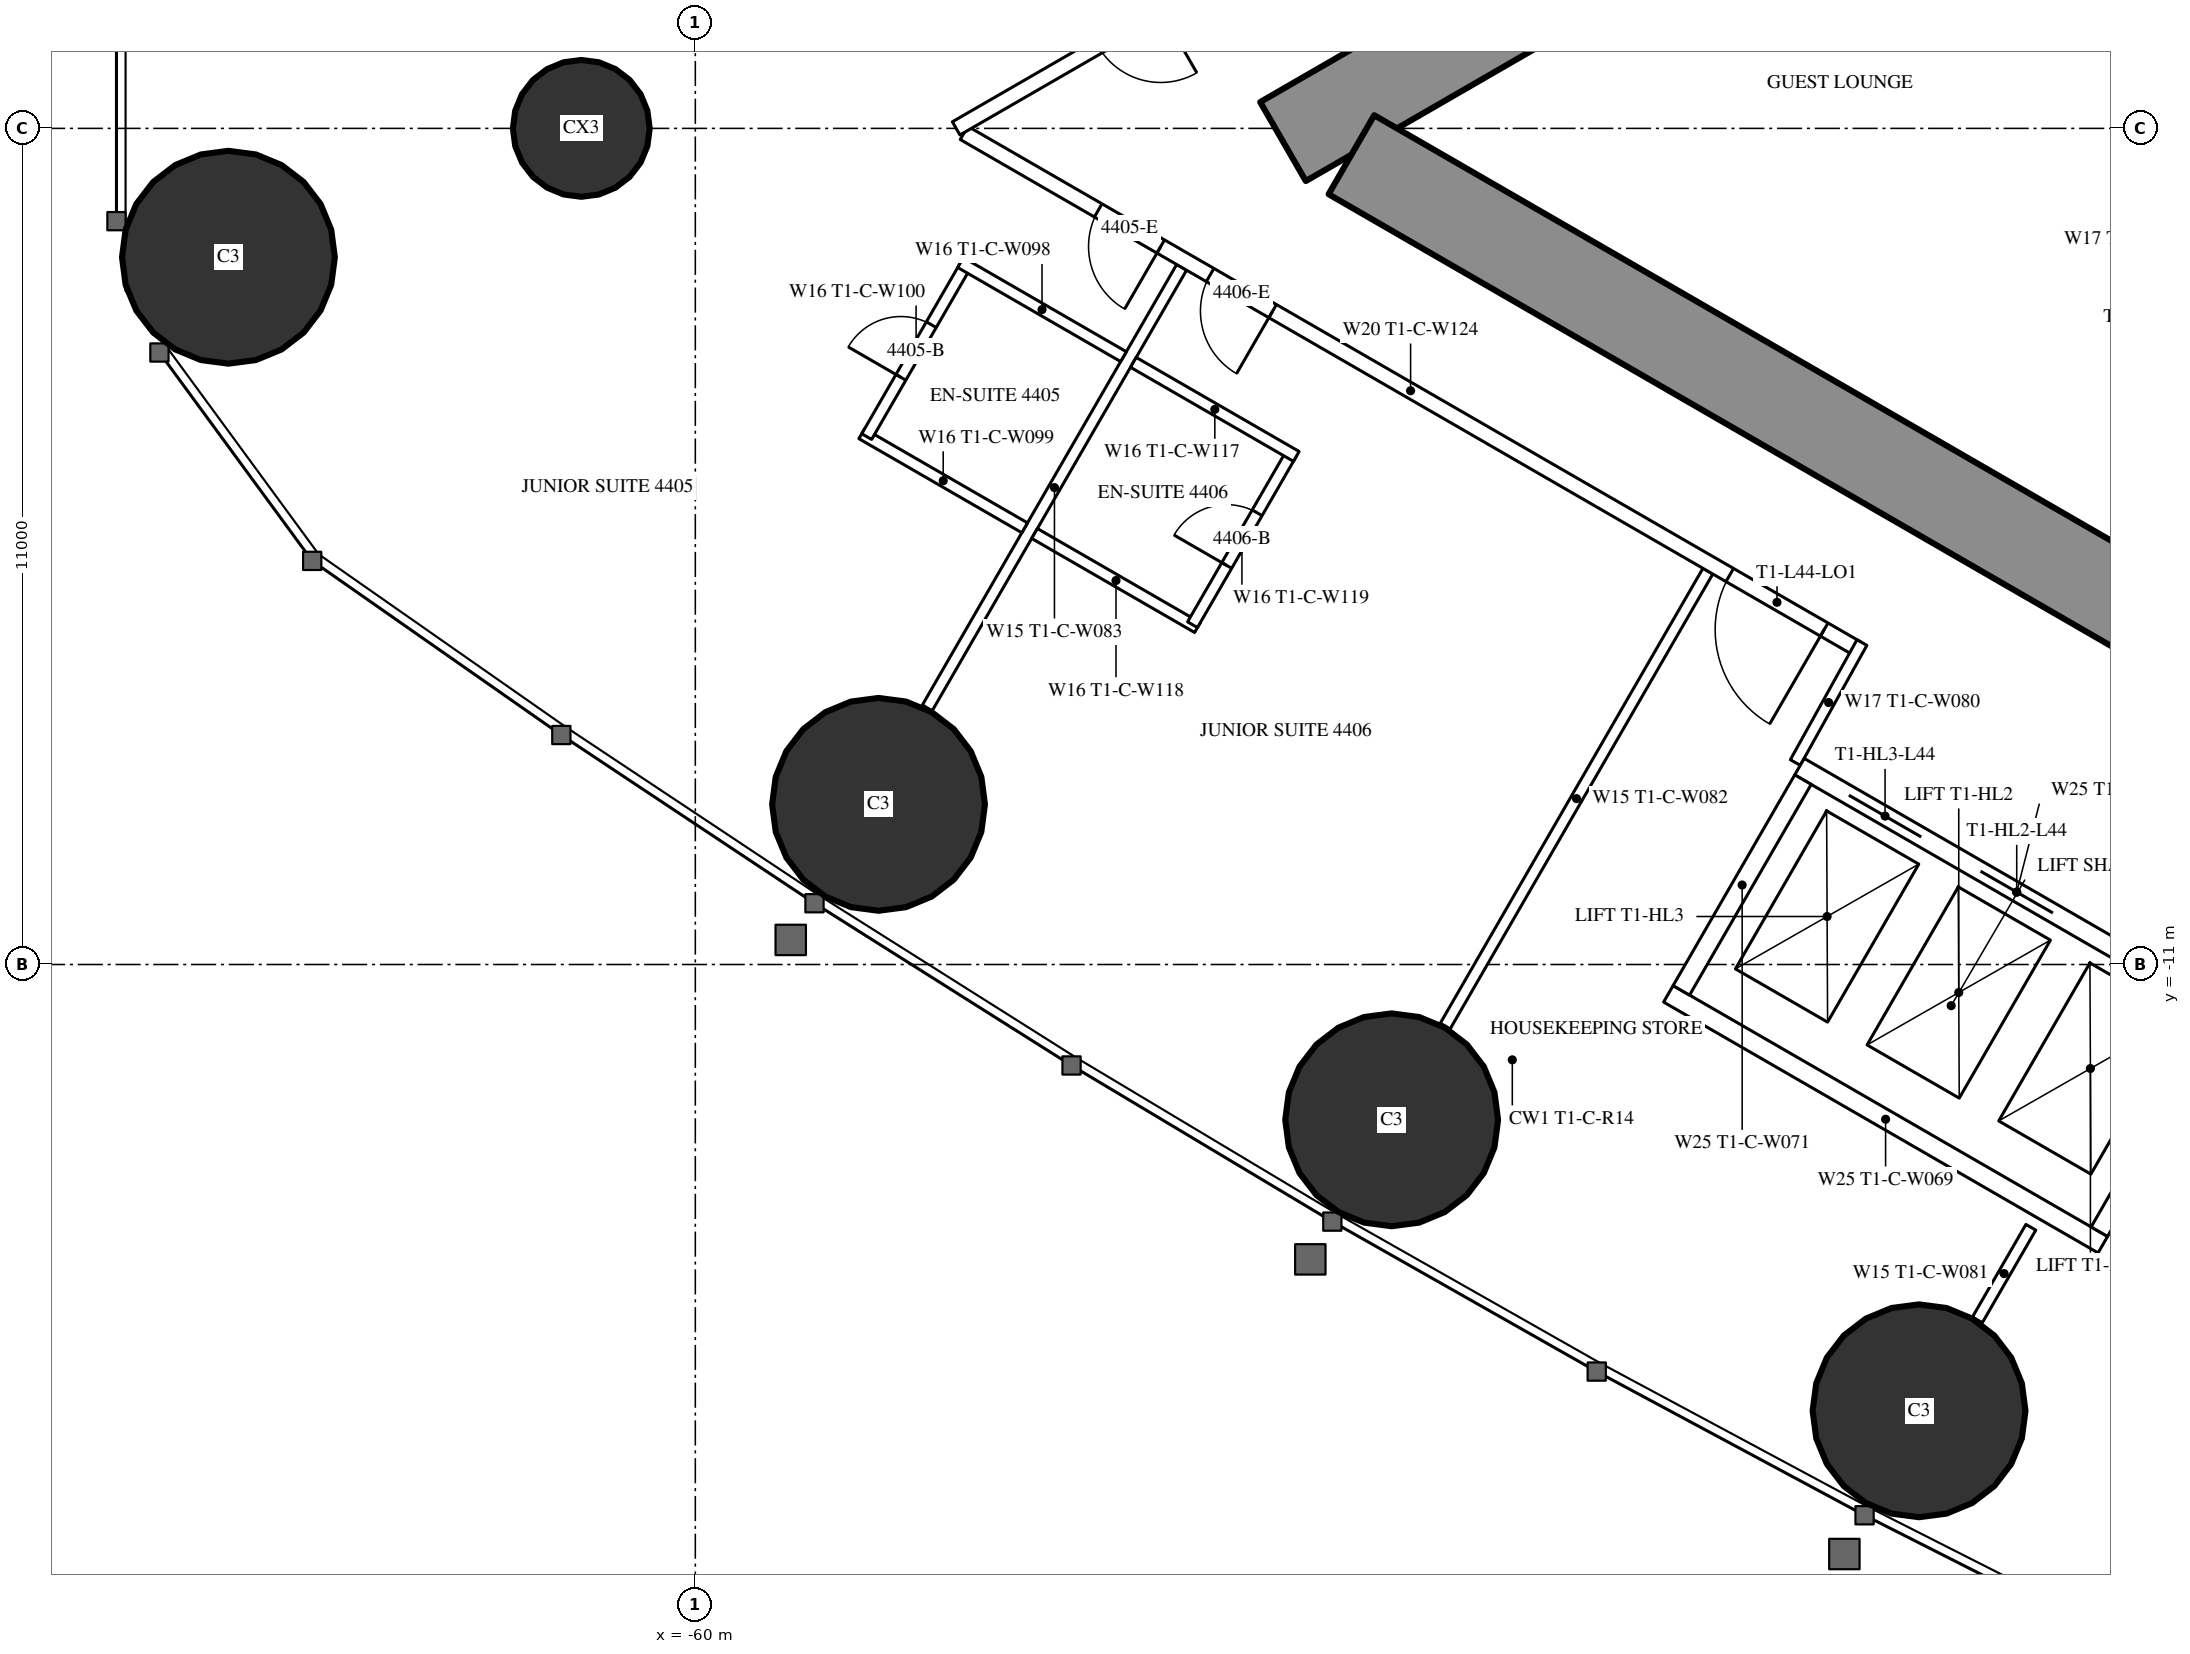
"""IFC4 building model, lengths in metres.
Left out: names, types, materials, properties, quantities, classifications, styles, units other than length and angle.
Written with IfcOpenShell. Run it as: python <this file> out.ifc"""

import sys

from ifc_helpers import new_model, si_unit, direction, frame, frame_2d, origin, origin_2d, place, context, subcontext, project, spatial, rectangle, circle, extrude, element, fill, save


model = new_model("IFC4")
c1 = context("Model", 3, precision=1e-05, world=origin(), true_north=direction((0.0, 1.0)))
c2 = subcontext(c1, "Body", "Model", "MODEL_VIEW")
j1 = project(units=[si_unit("LENGTHUNIT", "METRE"), si_unit("PLANEANGLEUNIT", "RADIAN")], contexts=[c1])
p1 = place(None, origin())
s1 = spatial("IfcSite", under=j1, at=p1, CompositionType="ELEMENT")
p2 = place(p1, origin())
s2 = spatial("IfcBuilding", under=s1, at=p2, CompositionType="ELEMENT")
p3 = place(p2, frame((0.0, 0.0, 166.8)))
s3 = spatial("IfcBuildingStorey", under=s2, at=p3, CompositionType="ELEMENT", Elevation=166.8)
for number, where, z_axis, x_axis in (
    (1, (-66.143, -1.695, 0.0), (0.0, 0.0, 1.0), (1.0, 0.0, 0.0)),
    (2, (-57.59, -8.893, 0.0), (0.0, 0.0, 1.0), (1.0, 0.0, 0.0)),
    (3, (-50.839, -13.043, 0.0), (0.0, 0.0, 1.0), (1.0, 0.0, 0.0)),
    (4, (-43.9, -16.871, 0.0), (0.0, 0.0, 1.0), (1.0, 0.0, 0.0)),
):
    element("IfcColumn", number, at=place(p3, frame(where, z_axis=z_axis, x_axis=x_axis)), inside=s3, PredefinedType="COLUMN", context=c2, shape_type="SweptSolid", body=[
        extrude(circle(Radius=1.4, at=origin_2d()), origin(), (0.0, 0.0, 1.0), 3.5),
    ])
p4 = place(p3, frame((-61.5, 0.0, 0.0), z_axis=(0.0, 0.0, 1.0), x_axis=(1.0, 0.0, 0.0)))
e5 = element("IfcColumn", 5, at=p4, inside=s3, PredefinedType="COLUMN", context=c2, shape_type="SweptSolid", body=[
    extrude(circle(Radius=0.9, at=origin_2d()), origin(), (0.0, 0.0, 1.0), 3.5),
])
p5 = place(p3, frame((-27.2, 14.3, 0.0), z_axis=(0.0, 0.0, 1.0), x_axis=(-0.866026593062, -0.499997940104, 0.0)))
e6 = element("IfcWall", 6, at=p5, inside=s3, PredefinedType="SHEAR", context=c2, shape_type="SweptSolid", body=[
    extrude(rectangle(XDim=28.946, YDim=1.2, at=frame_2d((14.473, 0.0))), origin(), (0.0, 0.0, 1.0), 3.5),
])
p6 = place(p5, frame((4.6, 0.0, 0.0)))
e7 = element("IfcOpeningElement", 7, at=p6, cuts=e6, PredefinedType="OPENING", context=c2, shape_type="SweptSolid", body=[
    extrude(rectangle(XDim=1.0, YDim=2.2, at=frame_2d((0.5, 1.1))), frame((0.0, 0.61, 0.0), z_axis=(0.0, -1.0, 0.0), x_axis=(1.0, 0.0, 0.0)), (0.0, 0.0, 1.0), 1.22),
])
p7 = place(p5, frame((13.395, 0.0, 0.0)))
e8 = element("IfcOpeningElement", 8, at=p7, cuts=e6, PredefinedType="OPENING", context=c2, shape_type="SweptSolid", body=[
    extrude(rectangle(XDim=1.8, YDim=2.2, at=frame_2d((0.9, 1.1))), frame((0.0, 0.61, 0.0), z_axis=(0.0, -1.0, 0.0), x_axis=(1.0, 0.0, 0.0)), (0.0, 0.0, 1.0), 1.22),
])
p8 = place(p3, frame((-27.2, -14.3, 0.0), z_axis=(0.0, 0.0, 1.0), x_axis=(-0.866024021859, 0.500002393557, 0.0)))
e9 = element("IfcWall", 9, at=p8, inside=s3, PredefinedType="SHEAR", context=c2, shape_type="SweptSolid", body=[
    extrude(rectangle(XDim=27.907, YDim=1.2, at=frame_2d((13.954, 0.0))), origin(), (0.0, 0.0, 1.0), 3.5),
])
p9 = place(p8, frame((4.6, 0.0, 0.0)))
e10 = element("IfcOpeningElement", 10, at=p9, cuts=e9, PredefinedType="OPENING", context=c2, shape_type="SweptSolid", body=[
    extrude(rectangle(XDim=1.0, YDim=2.2, at=frame_2d((0.5, 1.1))), frame((0.0, 0.61, 0.0), z_axis=(0.0, -1.0, 0.0), x_axis=(1.0, 0.0, 0.0)), (0.0, 0.0, 1.0), 1.22),
])
p10 = place(p8, frame((13.395, 0.0, 0.0)))
e11 = element("IfcOpeningElement", 11, at=p10, cuts=e9, PredefinedType="OPENING", context=c2, shape_type="SweptSolid", body=[
    extrude(rectangle(XDim=1.8, YDim=2.2, at=frame_2d((0.9, 1.1))), frame((0.0, 0.61, 0.0), z_axis=(0.0, -1.0, 0.0), x_axis=(1.0, 0.0, 0.0)), (0.0, 0.0, 1.0), 1.22),
])
p11 = place(p3, frame((-46.679, -5.825, 0.0), z_axis=(0.0, 0.0, 1.0), x_axis=(-0.500006839597, -0.866021454905, 0.0)))
e12 = element("IfcWall", 12, at=p11, inside=s3, PredefinedType="PARTITIONING", context=c2, shape_type="SweptSolid", body=[
    extrude(rectangle(XDim=6.911, YDim=0.15, at=frame_2d((3.456, 0.0))), origin(), (0.0, 0.0, 1.0), 2.3),
])
p12 = place(p3, frame((-53.602, -1.828, 0.0), z_axis=(0.0, 0.0, 1.0), x_axis=(-0.49999191814, -0.866030069798, 0.0)))
e13 = element("IfcWall", 13, at=p12, inside=s3, PredefinedType="PARTITIONING", context=c2, shape_type="SweptSolid", body=[
    extrude(rectangle(XDim=6.692, YDim=0.15, at=frame_2d((3.346, 0.0))), origin(), (0.0, 0.0, 1.0), 2.3),
])
p13 = place(p3, frame((-42.429, -14.457, 0.0), z_axis=(0.0, 0.0, 1.0), x_axis=(-0.5000578829, -0.865991982497, 0.0)))
e14 = element("IfcWall", 14, at=p13, inside=s3, PredefinedType="PARTITIONING", context=c2, shape_type="SweptSolid", body=[
    extrude(rectangle(XDim=1.407, YDim=0.15, at=frame_2d((0.704, 0.0))), origin(), (0.0, 0.0, 1.0), 3.25),
])
p14 = place(p3, frame((-44.715, -6.844, 0.0), z_axis=(0.0, 0.0, 1.0), x_axis=(-0.866025261224, 0.500000246922, 0.0)))
e15 = element("IfcWall", 15, at=p14, inside=s3, PredefinedType="PARTITIONING", context=c2, shape_type="SweptSolid", body=[
    extrude(rectangle(XDim=13.567, YDim=0.2, at=frame_2d((6.783, 0.0))), origin(), (0.0, 0.0, 1.0), 3.25),
])
p15 = place(p14, frame((10.579, 0.0, 0.0)))
e16 = element("IfcOpeningElement", 16, at=p15, cuts=e15, PredefinedType="OPENING", context=c2, shape_type="SweptSolid", body=[
    extrude(rectangle(XDim=0.95, YDim=2.2, at=frame_2d((0.475, 1.1))), frame((0.0, 0.11, 0.0), z_axis=(0.0, -1.0, 0.0), x_axis=(1.0, 0.0, 0.0)), (0.0, 0.0, 1.0), 0.22),
])
p16 = place(p14, frame((8.879, 0.0, 0.0)))
e17 = element("IfcOpeningElement", 17, at=p16, cuts=e15, PredefinedType="OPENING", context=c2, shape_type="SweptSolid", body=[
    extrude(rectangle(XDim=0.95, YDim=2.2, at=frame_2d((0.475, 1.1))), frame((0.0, 0.11, 0.0), z_axis=(0.0, -1.0, 0.0), x_axis=(1.0, 0.0, 0.0)), (0.0, 0.0, 1.0), 0.22),
])
p17 = place(p14, frame((0.5, 0.0, 0.0)))
e18 = element("IfcOpeningElement", 18, at=p17, cuts=e15, PredefinedType="OPENING", context=c2, shape_type="SweptSolid", body=[
    extrude(rectangle(XDim=1.435, YDim=2.2, at=frame_2d((0.718, 1.1))), frame((0.0, 0.11, 0.0), z_axis=(0.0, -1.0, 0.0), x_axis=(1.0, 0.0, 0.0)), (0.0, 0.0, 1.0), 0.22),
])
p18 = place(p3, frame((-44.652, -6.764, 0.0), z_axis=(0.0, 0.0, 1.0), x_axis=(-0.485424724123, -0.874278466629, 0.0)))
e19 = element("IfcWall", 19, at=p18, inside=s3, PredefinedType="PARTITIONING", context=c2, shape_type="SweptSolid", body=[
    extrude(rectangle(XDim=1.805, YDim=0.15, at=frame_2d((0.903, 0.0))), origin(), (0.0, 0.0, 1.0), 3.25),
])
p19 = place(p3, frame((-46.65, 5.726, 0.0), z_axis=(0.0, 0.0, 1.0), x_axis=(-0.866027963864, -0.499995565786, 0.0)))
e20 = element("IfcWall", 20, at=p19, inside=s3, PredefinedType="PARTITIONING", context=c2, shape_type="SweptSolid", body=[
    extrude(rectangle(XDim=11.452, YDim=0.2, at=frame_2d((5.726, 0.0))), origin(), (0.0, 0.0, 1.0), 3.25),
])
p20 = place(p19, frame((4.294, 0.0, 0.0)))
e21 = element("IfcOpeningElement", 21, at=p20, cuts=e20, PredefinedType="OPENING", context=c2, shape_type="SweptSolid", body=[
    extrude(rectangle(XDim=0.95, YDim=2.2, at=frame_2d((0.475, 1.1))), frame((0.0, 0.11, 0.0), z_axis=(0.0, -1.0, 0.0), x_axis=(1.0, 0.0, 0.0)), (0.0, 0.0, 1.0), 0.22),
])
p21 = place(p19, frame((8.344, 0.0, 0.0)))
e22 = element("IfcOpeningElement", 22, at=p21, cuts=e20, PredefinedType="OPENING", context=c2, shape_type="SweptSolid", body=[
    extrude(rectangle(XDim=0.95, YDim=2.2, at=frame_2d((0.475, 1.1))), frame((0.0, 0.11, 0.0), z_axis=(0.0, -1.0, 0.0), x_axis=(1.0, 0.0, 0.0)), (0.0, 0.0, 1.0), 0.22),
])
p22 = place(p3, frame((-55.667, -5.255, 0.0), z_axis=(0.0, 0.0, 1.0), x_axis=(-0.866006523861, 0.500032699561, 0.0)))
e23 = element("IfcWall", 23, at=p22, inside=s3, PredefinedType="PARTITIONING", context=c2, shape_type="SweptSolid", body=[
    extrude(rectangle(XDim=2.475, YDim=0.15, at=frame_2d((1.237, 0.0))), origin(), (0.0, 0.0, 1.0), 3.25),
])
p23 = place(p3, frame((-56.446, -1.803, 0.0), z_axis=(0.0, 0.0, 1.0), x_axis=(-0.499936506574, -0.866062058628, 0.0)))
e24 = element("IfcWall", 24, at=p23, inside=s3, PredefinedType="PARTITIONING", context=c2, shape_type="SweptSolid", body=[
    extrude(rectangle(XDim=2.6, YDim=0.15, at=frame_2d((1.3, 0.0))), origin(), (0.0, 0.0, 1.0), 3.25),
])
p24 = place(p23, frame((0.9, 0.0, 0.0)))
e25 = element("IfcOpeningElement", 25, at=p24, cuts=e24, PredefinedType="OPENING", context=c2, shape_type="SweptSolid", body=[
    extrude(rectangle(XDim=0.8, YDim=2.2, at=frame_2d((0.4, 1.1))), frame((0.0, 0.085, 0.0), z_axis=(0.0, -1.0, 0.0), x_axis=(1.0, 0.0, 0.0)), (0.0, 0.0, 1.0), 0.17),
])
for number, where, z_axis, x_axis in (
    (26, (-54.367, -3.003, 0.0), (0.0, 0.0, 1.0), (-0.866, 0.5, 0.0)),
    (27, (-53.394, -6.567, 0.0), (0.0, 0.0, 1.0), (-0.866, 0.5, 0.0)),
):
    element("IfcWall", number, at=place(p3, frame(where, z_axis=z_axis, x_axis=x_axis)), inside=s3, PredefinedType="PARTITIONING", context=c2, shape_type="SweptSolid", body=[
        extrude(rectangle(XDim=2.475, YDim=0.15, at=frame_2d((1.238, 0.0))), origin(), (0.0, 0.0, 1.0), 3.25),
    ])
p25 = place(p3, frame((-52.159, -4.278, 0.0), z_axis=(0.0, 0.0, 1.0), x_axis=(-0.500047596559, -0.865997922154, 0.0)))
e28 = element("IfcWall", 28, at=p25, inside=s3, PredefinedType="PARTITIONING", context=c2, shape_type="SweptSolid", body=[
    extrude(rectangle(XDim=2.6, YDim=0.15, at=frame_2d((1.3, 0.0))), origin(), (0.0, 0.0, 1.0), 3.25),
])
p26 = place(p25, frame((0.9, 0.0, 0.0)))
e29 = element("IfcOpeningElement", 29, at=p26, cuts=e28, PredefinedType="OPENING", context=c2, shape_type="SweptSolid", body=[
    extrude(rectangle(XDim=0.8, YDim=2.2, at=frame_2d((0.4, 1.1))), frame((0.0, 0.085, 0.0), z_axis=(0.0, -1.0, 0.0), x_axis=(1.0, 0.0, 0.0)), (0.0, 0.0, 1.0), 0.17),
])
p27 = place(p3, frame((-52.094, -4.315, 0.0), z_axis=(0.0, 0.0, 1.0), x_axis=(-0.866006523861, 0.500032699561, 0.0)))
e30 = element("IfcWall", 30, at=p27, inside=s3, PredefinedType="PARTITIONING", context=c2, shape_type="SweptSolid", body=[
    extrude(rectangle(XDim=2.475, YDim=0.15, at=frame_2d((1.237, 0.0))), origin(), (0.0, 0.0, 1.0), 2.45),
])
p28 = place(p3, frame((-39.758, -11.697, 0.0), z_axis=(0.0, 0.0, 1.0), x_axis=(-0.866024194504, 0.500002094529, 0.0)))
e31 = element("IfcWall", 31, at=p28, inside=s3, PredefinedType="PARTITIONING", context=c2, shape_type="SweptSolid", body=[
    extrude(rectangle(XDim=6.6, YDim=0.25, at=frame_2d((3.3, 0.0))), origin(), (0.0, 0.0, 1.0), 3.25),
])
p29 = place(p28, frame((0.75, 0.0, 0.0)))
e32 = element("IfcOpeningElement", 32, at=p29, cuts=e31, PredefinedType="OPENING", context=c2, shape_type="SweptSolid", body=[
    extrude(rectangle(XDim=1.1, YDim=2.2, at=frame_2d((0.55, 1.1))), frame((0.0, 0.135, 0.0), z_axis=(0.0, -1.0, 0.0), x_axis=(1.0, 0.0, 0.0)), (0.0, 0.0, 1.0), 0.27),
])
p30 = place(p28, frame((2.75, 0.0, 0.0)))
e33 = element("IfcOpeningElement", 33, at=p30, cuts=e31, PredefinedType="OPENING", context=c2, shape_type="SweptSolid", body=[
    extrude(rectangle(XDim=1.1, YDim=2.2, at=frame_2d((0.55, 1.1))), frame((0.0, 0.135, 0.0), z_axis=(0.0, -1.0, 0.0), x_axis=(1.0, 0.0, 0.0)), (0.0, 0.0, 1.0), 0.27),
])
p31 = place(p28, frame((4.75, 0.0, 0.0)))
e34 = element("IfcOpeningElement", 34, at=p31, cuts=e31, PredefinedType="OPENING", context=c2, shape_type="SweptSolid", body=[
    extrude(rectangle(XDim=1.1, YDim=2.2, at=frame_2d((0.55, 1.1))), frame((0.0, 0.135, 0.0), z_axis=(0.0, -1.0, 0.0), x_axis=(1.0, 0.0, 0.0)), (0.0, 0.0, 1.0), 0.27),
])
p32 = place(p3, frame((-41.482, -14.686, 0.0), z_axis=(0.0, 0.0, 1.0), x_axis=(-0.86603344179, 0.499986077507, 0.0)))
e35 = element("IfcWall", 35, at=p32, inside=s3, PredefinedType="PARTITIONING", context=c2, shape_type="SweptSolid", body=[
    extrude(rectangle(XDim=6.6, YDim=0.25, at=frame_2d((3.3, 0.0))), origin(), (0.0, 0.0, 1.0), 3.25),
])
for number, where, z_axis, x_axis in (
    (36, (-39.928, -11.743, 0.0), (0.0, 0.0, 1.0), (-0.5, -0.866, 0.0)),
    (37, (-45.428, -8.568, 0.0), (0.0, 0.0, 1.0), (-0.5, -0.866, 0.0)),
):
    element("IfcWall", number, at=place(p3, frame(where, z_axis=z_axis, x_axis=x_axis)), inside=s3, PredefinedType="PARTITIONING", context=c2, shape_type="SweptSolid", body=[
        extrude(rectangle(XDim=3.201, YDim=0.25, at=frame_2d((1.6, 0.0))), origin(), (0.0, 0.0, 1.0), 3.25),
    ])
p33 = place(p24, origin())
e38 = element("IfcDoor", 38, at=p33, inside=s3, OperationType="SINGLE_SWING_RIGHT", PredefinedType="DOOR", context=c2, shape_type="SweptSolid", body=[
    extrude(rectangle(XDim=0.8, YDim=2.2, at=frame_2d((0.4, 1.1))), frame((0.0, 0.025, 0.0), z_axis=(0.0, -1.0, 0.0), x_axis=(1.0, 0.0, 0.0)), (0.0, 0.0, 1.0), 0.05),
])
fill(e25, e38)
p34 = place(p15, origin())
e39 = element("IfcDoor", 39, at=p34, inside=s3, OperationType="SINGLE_SWING_LEFT", PredefinedType="DOOR", context=c2, shape_type="SweptSolid", body=[
    extrude(rectangle(XDim=0.95, YDim=2.2, at=frame_2d((0.475, 1.1))), frame((0.0, 0.025, 0.0), z_axis=(0.0, -1.0, 0.0), x_axis=(1.0, 0.0, 0.0)), (0.0, 0.0, 1.0), 0.05),
])
fill(e16, e39)
p35 = place(p26, origin())
e40 = element("IfcDoor", 40, at=p35, inside=s3, OperationType="SINGLE_SWING_RIGHT", PredefinedType="DOOR", context=c2, shape_type="SweptSolid", body=[
    extrude(rectangle(XDim=0.8, YDim=2.2, at=frame_2d((0.4, 1.1))), frame((0.0, 0.025, 0.0), z_axis=(0.0, -1.0, 0.0), x_axis=(1.0, 0.0, 0.0)), (0.0, 0.0, 1.0), 0.05),
])
fill(e29, e40)
p36 = place(p16, origin())
e41 = element("IfcDoor", 41, at=p36, inside=s3, OperationType="SINGLE_SWING_LEFT", PredefinedType="DOOR", context=c2, shape_type="SweptSolid", body=[
    extrude(rectangle(XDim=0.95, YDim=2.2, at=frame_2d((0.475, 1.1))), frame((0.0, 0.025, 0.0), z_axis=(0.0, -1.0, 0.0), x_axis=(1.0, 0.0, 0.0)), (0.0, 0.0, 1.0), 0.05),
])
fill(e17, e41)
p37 = place(p17, origin())
e42 = element("IfcDoor", 42, at=p37, inside=s3, OperationType="SINGLE_SWING_LEFT", PredefinedType="DOOR", context=c2, shape_type="SweptSolid", body=[
    extrude(rectangle(XDim=1.435, YDim=2.2, at=frame_2d((0.718, 1.1))), frame((0.0, 0.025, 0.0), z_axis=(0.0, -1.0, 0.0), x_axis=(1.0, 0.0, 0.0)), (0.0, 0.0, 1.0), 0.05),
])
fill(e18, e42)
p38 = place(p30, origin())
e43 = element("IfcDoor", 43, at=p38, inside=s3, OperationType="DOUBLE_DOOR_SLIDING", PredefinedType="USERDEFINED", context=c2, shape_type="SweptSolid", body=[
    extrude(rectangle(XDim=1.1, YDim=2.2, at=frame_2d((0.55, 1.1))), frame((0.0, 0.025, 0.0), z_axis=(0.0, -1.0, 0.0), x_axis=(1.0, 0.0, 0.0)), (0.0, 0.0, 1.0), 0.05),
])
fill(e33, e43)
p39 = place(p31, origin())
e44 = element("IfcDoor", 44, at=p39, inside=s3, OperationType="DOUBLE_DOOR_SLIDING", PredefinedType="USERDEFINED", context=c2, shape_type="SweptSolid", body=[
    extrude(rectangle(XDim=1.1, YDim=2.2, at=frame_2d((0.55, 1.1))), frame((0.0, 0.025, 0.0), z_axis=(0.0, -1.0, 0.0), x_axis=(1.0, 0.0, 0.0)), (0.0, 0.0, 1.0), 0.05),
])
fill(e34, e44)
save(model, sys.argv[1])
